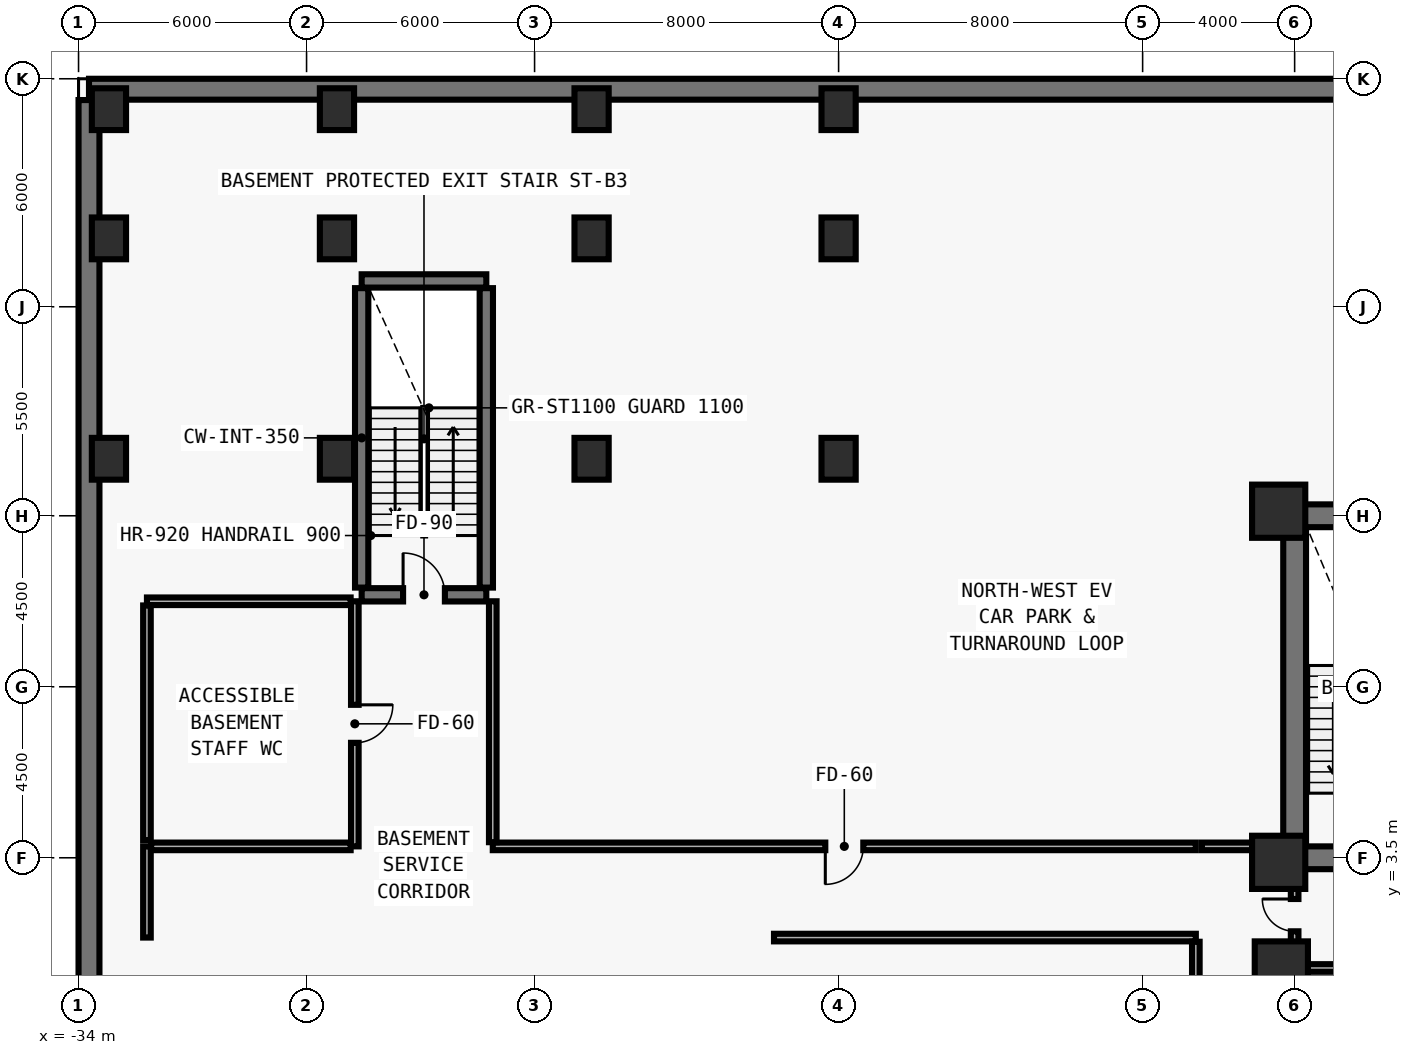
"""IFC4 building model, lengths in metres.
Left out: names, types, materials, properties, quantities, classifications, styles, units other than length and angle.
Written with IfcOpenShell. Run it as: python <this file> out.ifc"""

import sys

from ifc_helpers import new_model, si_unit, direction, frame, frame_2d, origin, origin_2d, place, context, subcontext, project, spatial, rectangle, extrude, element, fill, save


model = new_model("IFC4")
c1 = context("Model", 3, precision=1e-05, world=origin(), true_north=direction((0.0, 1.0)))
c2 = subcontext(c1, "Body", "Model", "MODEL_VIEW")
j1 = project(units=[si_unit("LENGTHUNIT", "METRE"), si_unit("PLANEANGLEUNIT", "RADIAN")], contexts=[c1])
p1 = place(None, origin())
s1 = spatial("IfcSite", under=j1, at=p1, CompositionType="ELEMENT")
p2 = place(p1, origin())
s2 = spatial("IfcBuilding", under=s1, at=p2, CompositionType="ELEMENT")
p3 = place(p2, frame((0.0, 0.0, -4.5)))
s3 = spatial("IfcBuildingStorey", under=s2, at=p3, CompositionType="ELEMENT", Elevation=-4.5)
p4 = place(p3, frame((-26.55, 10.42, 0.0), z_axis=(0.0, 0.0, 1.0), x_axis=(1.0, 0.0, 0.0)))
e1 = element("IfcWall", 1, at=p4, inside=s3, PredefinedType="SHEAR", context=c2, shape_type="SweptSolid", body=[
    extrude(rectangle(XDim=3.28, YDim=0.35, at=frame_2d((1.64, 0.0))), origin(), (0.0, 0.0, 1.0), 4.492),
])
p5 = place(p4, frame((1.09, 0.0, 0.0)))
e2 = element("IfcOpeningElement", 2, at=p5, cuts=e1, PredefinedType="OPENING", context=c2, shape_type="SweptSolid", body=[
    extrude(rectangle(XDim=1.1, YDim=2.15, at=frame_2d((0.55, 1.075))), frame((0.0, 0.185, 0.0), z_axis=(0.0, -1.0, 0.0), x_axis=(1.0, 0.0, 0.0)), (0.0, 0.0, 1.0), 0.37),
])
p6 = place(p3, frame((-26.55, 18.68, 0.0), z_axis=(0.0, 0.0, 1.0), x_axis=(1.0, 0.0, 0.0)))
e3 = element("IfcWall", 3, at=p6, inside=s3, PredefinedType="SHEAR", context=c2, shape_type="SweptSolid", body=[
    extrude(rectangle(XDim=3.28, YDim=0.35, at=frame_2d((1.64, 0.0))), origin(), (0.0, 0.0, 1.0), 4.492),
])
for number, where, z_axis, x_axis in (
    (4, (-26.55, 10.61, 0.0), (0.0, 0.0, 1.0), (0.0, 1.0, 0.0)),
    (5, (-23.27, 10.61, 0.0), (0.0, 0.0, 1.0), (0.0, 1.0, 0.0)),
):
    element("IfcWall", number, at=place(p3, frame(where, z_axis=z_axis, x_axis=x_axis)), inside=s3, PredefinedType="SHEAR", context=c2, shape_type="SweptSolid", body=[
        extrude(rectangle(XDim=7.88, YDim=0.35, at=frame_2d((3.94, 0.0))), origin(), (0.0, 0.0, 1.0), 4.492),
    ])
p7 = place(p3, frame((-2.0, 3.5, 0.0), z_axis=(0.0, 0.0, 1.0), x_axis=(1.0, 0.0, 0.0)))
e6 = element("IfcWall", 6, at=p7, inside=s3, PredefinedType="SHEAR", context=c2, shape_type="SweptSolid", body=[
    extrude(rectangle(XDim=10.0, YDim=0.6, at=frame_2d((5.0, 0.0))), origin(), (0.0, 0.0, 1.0), 4.492),
])
p8 = place(p7, frame((1.65, 0.0, 0.0)))
e7 = element("IfcOpeningElement", 7, at=p8, cuts=e6, PredefinedType="OPENING", context=c2, shape_type="SweptSolid", body=[
    extrude(rectangle(XDim=1.1, YDim=2.15, at=frame_2d((0.55, 1.075))), frame((0.0, 0.31, 0.0), z_axis=(0.0, -1.0, 0.0), x_axis=(1.0, 0.0, 0.0)), (0.0, 0.0, 1.0), 0.62),
])
p9 = place(p7, frame((7.65, 0.0, 0.0)))
e8 = element("IfcOpeningElement", 8, at=p9, cuts=e6, PredefinedType="OPENING", context=c2, shape_type="SweptSolid", body=[
    extrude(rectangle(XDim=1.1, YDim=2.15, at=frame_2d((0.55, 1.075))), frame((0.0, 0.31, 0.0), z_axis=(0.0, -1.0, 0.0), x_axis=(1.0, 0.0, 0.0)), (0.0, 0.0, 1.0), 0.62),
])
p10 = place(p7, frame((3.72, 0.0, 0.0)))
e9 = element("IfcOpeningElement", 9, at=p10, cuts=e6, PredefinedType="OPENING", context=c2, shape_type="SweptSolid", body=[
    extrude(rectangle(XDim=1.1, YDim=2.2, at=frame_2d((0.55, 1.1))), frame((0.0, 0.31, 0.0), z_axis=(0.0, -1.0, 0.0), x_axis=(1.0, 0.0, 0.0)), (0.0, 0.0, 1.0), 0.62),
])
p11 = place(p7, frame((5.18, 0.0, 0.0)))
e10 = element("IfcOpeningElement", 10, at=p11, cuts=e6, PredefinedType="OPENING", context=c2, shape_type="SweptSolid", body=[
    extrude(rectangle(XDim=1.1, YDim=2.2, at=frame_2d((0.55, 1.1))), frame((0.0, 0.31, 0.0), z_axis=(0.0, -1.0, 0.0), x_axis=(1.0, 0.0, 0.0)), (0.0, 0.0, 1.0), 0.62),
])
p12 = place(p3, frame((-2.0, 12.5, 0.0), z_axis=(0.0, 0.0, 1.0), x_axis=(1.0, 0.0, 0.0)))
e11 = element("IfcWall", 11, at=p12, inside=s3, PredefinedType="SHEAR", context=c2, shape_type="SweptSolid", body=[
    extrude(rectangle(XDim=10.0, YDim=0.6, at=frame_2d((5.0, 0.0))), origin(), (0.0, 0.0, 1.0), 4.492),
])
p13 = place(p12, frame((3.92, 0.0, 0.0)))
e12 = element("IfcOpeningElement", 12, at=p13, cuts=e11, PredefinedType="OPENING", context=c2, shape_type="SweptSolid", body=[
    extrude(rectangle(XDim=0.85, YDim=2.1, at=frame_2d((0.425, 1.05))), frame((0.0, 0.31, 0.0), z_axis=(0.0, -1.0, 0.0), x_axis=(1.0, 0.0, 0.0)), (0.0, 0.0, 1.0), 0.62),
])
p14 = place(p3, frame((-2.0, 3.81, 0.0), z_axis=(0.0, 0.0, 1.0), x_axis=(0.0, 1.0, 0.0)))
e13 = element("IfcWall", 13, at=p14, inside=s3, PredefinedType="SHEAR", context=c2, shape_type="SweptSolid", body=[
    extrude(rectangle(XDim=8.38, YDim=0.6, at=frame_2d((4.19, 0.0))), origin(), (0.0, 0.0, 1.0), 4.492),
])
p15 = place(p3, frame((-33.725, 23.725, 0.0), z_axis=(0.0, 0.0, 1.0), x_axis=(1.0, 0.0, 0.0)))
e14 = element("IfcWall", 14, at=p15, inside=s3, PredefinedType="SOLIDWALL", context=c2, shape_type="SweptSolid", body=[
    extrude(rectangle(XDim=67.45, YDim=0.55, at=frame_2d((33.725, 0.0))), origin(), (0.0, 0.0, 1.0), 4.492),
])
p16 = place(p3, frame((-33.725, -23.44, 0.0), z_axis=(0.0, 0.0, 1.0), x_axis=(0.0, 1.0, 0.0)))
e15 = element("IfcWall", 15, at=p16, inside=s3, PredefinedType="SOLIDWALL", context=c2, shape_type="SweptSolid", body=[
    extrude(rectangle(XDim=46.88, YDim=0.55, at=frame_2d((23.44, 0.0))), origin(), (0.0, 0.0, 1.0), 4.492),
])
for number, where, z_axis, x_axis in (
    (16, (-2.42, 12.62, 0.0), (0.0, 0.0, 1.0), (1.0, 0.0, 0.0)),
    (17, (-2.42, 3.38, 0.0), (0.0, 0.0, 1.0), (1.0, 0.0, 0.0)),
    (18, (-2.35, 0.6, 0.0), (0.0, 0.0, 1.0), (1.0, 0.0, 0.0)),
):
    element("IfcColumn", number, at=place(p3, frame(where, z_axis=z_axis, x_axis=x_axis)), inside=s3, PredefinedType="COLUMN", context=c2, shape_type="SweptSolid", body=[
        extrude(rectangle(XDim=1.4, YDim=1.4, at=origin_2d()), origin(), (0.0, 0.0, 1.0), 4.475),
    ])
for number, where, z_axis, x_axis in (
    (19, (-33.2, 14.0, 0.0), (0.0, 0.0, 1.0), (1.0, 0.0, 0.0)),
    (20, (-33.2, 19.8, 0.0), (0.0, 0.0, 1.0), (1.0, 0.0, 0.0)),
    (21, (-33.2, 23.2, 0.0), (0.0, 0.0, 1.0), (1.0, 0.0, 0.0)),
    (22, (-27.2, 14.0, 0.0), (0.0, 0.0, 1.0), (1.0, 0.0, 0.0)),
    (23, (-27.2, 19.8, 0.0), (0.0, 0.0, 1.0), (1.0, 0.0, 0.0)),
    (24, (-27.2, 23.2, 0.0), (0.0, 0.0, 1.0), (1.0, 0.0, 0.0)),
    (25, (-20.5, 14.0, 0.0), (0.0, 0.0, 1.0), (1.0, 0.0, 0.0)),
    (26, (-20.5, 19.8, 0.0), (0.0, 0.0, 1.0), (1.0, 0.0, 0.0)),
    (27, (-20.5, 23.2, 0.0), (0.0, 0.0, 1.0), (1.0, 0.0, 0.0)),
    (28, (-14.0, 14.0, 0.0), (0.0, 0.0, 1.0), (1.0, 0.0, 0.0)),
    (29, (-14.0, 19.8, 0.0), (0.0, 0.0, 1.0), (1.0, 0.0, 0.0)),
    (30, (-14.0, 23.2, 0.0), (0.0, 0.0, 1.0), (1.0, 0.0, 0.0)),
):
    element("IfcColumn", number, at=place(p3, frame(where, z_axis=z_axis, x_axis=x_axis)), inside=s3, PredefinedType="COLUMN", context=c2, shape_type="SweptSolid", body=[
        extrude(rectangle(XDim=0.9, YDim=1.1, at=origin_2d()), origin(), (0.0, 0.0, 1.0), 4.475),
    ])
p17 = place(p3, frame((-2.0, 0.72, 0.0), z_axis=(0.0, 0.0, 1.0), x_axis=(0.0, 1.0, 0.0)))
e31 = element("IfcWall", 31, at=p17, inside=s3, PredefinedType="MOVABLE", context=c2, shape_type="SweptSolid", body=[
    extrude(rectangle(XDim=2.25, YDim=0.2, at=frame_2d((1.125, 0.0))), origin(), (0.0, 0.0, 1.0), 3.262),
])
p18 = place(p17, frame((0.845, 0.0, 0.0)))
e32 = element("IfcOpeningElement", 32, at=p18, cuts=e31, PredefinedType="OPENING", context=c2, shape_type="SweptSolid", body=[
    extrude(rectangle(XDim=0.85, YDim=2.1, at=frame_2d((0.425, 1.05))), frame((0.0, 0.11, 0.0), z_axis=(0.0, -1.0, 0.0), x_axis=(1.0, 0.0, 0.0)), (0.0, 0.0, 1.0), 0.22),
])
p19 = place(p3, frame((-4.6, 3.8, 0.0), z_axis=(0.0, 0.0, 1.0), x_axis=(-1.0, 0.0, 0.0)))
e33 = element("IfcWall", 33, at=p19, inside=s3, PredefinedType="MOVABLE", context=c2, shape_type="SweptSolid", body=[
    extrude(rectangle(XDim=18.5, YDim=0.2, at=frame_2d((9.25, 0.0))), origin(), (0.0, 0.0, 1.0), 4.18),
])
p20 = place(p19, frame((8.75, 0.0, 0.0)))
e34 = element("IfcOpeningElement", 34, at=p20, cuts=e33, PredefinedType="OPENING", context=c2, shape_type="SweptSolid", body=[
    extrude(rectangle(XDim=1.0, YDim=2.1, at=frame_2d((0.5, 1.05))), frame((0.0, 0.11, 0.0), z_axis=(0.0, -1.0, 0.0), x_axis=(1.0, 0.0, 0.0)), (0.0, 0.0, 1.0), 0.22),
])
p21 = place(p3, frame((-26.73, 10.25, 0.0), z_axis=(0.0, 0.0, 1.0), x_axis=(0.0, -1.0, 0.0)))
e35 = element("IfcWall", 35, at=p21, inside=s3, PredefinedType="MOVABLE", context=c2, shape_type="SweptSolid", body=[
    extrude(rectangle(XDim=6.45, YDim=0.2, at=frame_2d((3.225, 0.0))), origin(), (0.0, 0.0, 1.0), 4.18),
])
p22 = place(p21, frame((2.725, 0.0, 0.0)))
e36 = element("IfcOpeningElement", 36, at=p22, cuts=e35, PredefinedType="OPENING", context=c2, shape_type="SweptSolid", body=[
    extrude(rectangle(XDim=1.0, YDim=2.1, at=frame_2d((0.5, 1.05))), frame((0.0, 0.11, 0.0), z_axis=(0.0, -1.0, 0.0), x_axis=(1.0, 0.0, 0.0)), (0.0, 0.0, 1.0), 0.22),
])
p23 = place(p3, frame((-1.88, 0.6, 0.0), z_axis=(0.0, 0.0, 1.0), x_axis=(1.0, 0.0, 0.0)))
e37 = element("IfcWall", 37, at=p23, inside=s3, PredefinedType="MOVABLE", context=c2, shape_type="SweptSolid", body=[
    extrude(rectangle(XDim=5.72, YDim=0.2, at=frame_2d((2.86, 0.0))), origin(), (0.0, 0.0, 1.0), 3.362),
])
p24 = place(p3, frame((-2.0, -4.09, 0.0), z_axis=(0.0, 0.0, 1.0), x_axis=(0.0, 1.0, 0.0)))
e38 = element("IfcWall", 38, at=p24, inside=s3, PredefinedType="MOVABLE", context=c2, shape_type="SweptSolid", body=[
    extrude(rectangle(XDim=4.59, YDim=0.2, at=frame_2d((2.295, 0.0))), origin(), (0.0, 0.0, 1.0), 3.362),
])
p25 = place(p3, frame((-15.7, 1.4, 0.0), z_axis=(0.0, 0.0, 1.0), x_axis=(1.0, 0.0, 0.0)))
e39 = element("IfcWall", 39, at=p25, inside=s3, PredefinedType="MOVABLE", context=c2, shape_type="SweptSolid", body=[
    extrude(rectangle(XDim=11.1, YDim=0.2, at=frame_2d((5.55, 0.0))), origin(), (0.0, 0.0, 1.0), 4.18),
])
p26 = place(p3, frame((-4.6, 1.29, 0.0), z_axis=(0.0, 0.0, 1.0), x_axis=(0.0, -1.0, 0.0)))
e40 = element("IfcWall", 40, at=p26, inside=s3, PredefinedType="MOVABLE", context=c2, shape_type="SweptSolid", body=[
    extrude(rectangle(XDim=5.49, YDim=0.2, at=frame_2d((2.745, 0.0))), origin(), (0.0, 0.0, 1.0), 4.18),
])
p27 = place(p3, frame((-23.1, 3.91, 0.0), z_axis=(0.0, 0.0, 1.0), x_axis=(0.0, 1.0, 0.0)))
e41 = element("IfcWall", 41, at=p27, inside=s3, PredefinedType="MOVABLE", context=c2, shape_type="SweptSolid", body=[
    extrude(rectangle(XDim=6.34, YDim=0.2, at=frame_2d((3.17, 0.0))), origin(), (0.0, 0.0, 1.0), 4.18),
])
p28 = place(p3, frame((-2.36, 3.8, 0.0), z_axis=(0.0, 0.0, 1.0), x_axis=(-1.0, 0.0, 0.0)))
e42 = element("IfcWall", 42, at=p28, inside=s3, PredefinedType="MOVABLE", context=c2, shape_type="SweptSolid", body=[
    extrude(rectangle(XDim=2.08, YDim=0.2, at=frame_2d((1.04, 0.0))), origin(), (0.0, 0.0, 1.0), 4.18),
])
p29 = place(p3, frame((-32.2, 3.8, 0.0), z_axis=(0.0, 0.0, 1.0), x_axis=(0.0, -1.0, 0.0)))
e43 = element("IfcWall", 43, at=p29, inside=s3, PredefinedType="MOVABLE", context=c2, shape_type="SweptSolid", body=[
    extrude(rectangle(XDim=2.4, YDim=0.2, at=frame_2d((1.2, 0.0))), origin(), (0.0, 0.0, 1.0), 4.18),
])
p30 = place(p3, frame((-26.84, 3.8, 0.0), z_axis=(0.0, 0.0, 1.0), x_axis=(-1.0, 0.0, 0.0)))
e44 = element("IfcWall", 44, at=p30, inside=s3, PredefinedType="MOVABLE", context=c2, shape_type="SweptSolid", body=[
    extrude(rectangle(XDim=5.25, YDim=0.2, at=frame_2d((2.625, 0.0))), origin(), (0.0, 0.0, 1.0), 4.18),
])
p31 = place(p3, frame((-26.84, 10.25, 0.0), z_axis=(0.0, 0.0, 1.0), x_axis=(-1.0, 0.0, 0.0)))
e45 = element("IfcWall", 45, at=p31, inside=s3, PredefinedType="MOVABLE", context=c2, shape_type="SweptSolid", body=[
    extrude(rectangle(XDim=5.36, YDim=0.2, at=frame_2d((2.68, 0.0))), origin(), (0.0, 0.0, 1.0), 4.18),
])
p32 = place(p3, frame((-32.2, 10.14, 0.0), z_axis=(0.0, 0.0, 1.0), x_axis=(0.0, -1.0, 0.0)))
e46 = element("IfcWall", 46, at=p32, inside=s3, PredefinedType="MOVABLE", context=c2, shape_type="SweptSolid", body=[
    extrude(rectangle(XDim=6.18, YDim=0.2, at=frame_2d((3.09, 0.0))), origin(), (0.0, 0.0, 1.0), 4.18),
])
p33 = place(p5, origin())
e47 = element("IfcDoor", 47, at=p33, inside=s3, OperationType="SINGLE_SWING_LEFT", PredefinedType="DOOR", context=c2, shape_type="SweptSolid", body=[
    extrude(rectangle(XDim=1.1, YDim=2.15, at=frame_2d((0.55, 1.075))), frame((0.0, 0.025, 0.0), z_axis=(0.0, -1.0, 0.0), x_axis=(1.0, 0.0, 0.0)), (0.0, 0.0, 1.0), 0.05),
])
fill(e2, e47)
p34 = place(p18, origin())
e48 = element("IfcDoor", 48, at=p34, inside=s3, OperationType="SINGLE_SWING_RIGHT", PredefinedType="DOOR", context=c2, shape_type="SweptSolid", body=[
    extrude(rectangle(XDim=0.85, YDim=2.1, at=frame_2d((0.425, 1.05))), frame((0.0, 0.025, 0.0), z_axis=(0.0, -1.0, 0.0), x_axis=(1.0, 0.0, 0.0)), (0.0, 0.0, 1.0), 0.05),
])
fill(e32, e48)
p35 = place(p20, origin())
e49 = element("IfcDoor", 49, at=p35, inside=s3, OperationType="SINGLE_SWING_RIGHT", PredefinedType="DOOR", context=c2, shape_type="SweptSolid", body=[
    extrude(rectangle(XDim=1.0, YDim=2.1, at=frame_2d((0.5, 1.05))), frame((0.0, 0.025, 0.0), z_axis=(0.0, -1.0, 0.0), x_axis=(1.0, 0.0, 0.0)), (0.0, 0.0, 1.0), 0.05),
])
fill(e34, e49)
p36 = place(p22, origin())
e50 = element("IfcDoor", 50, at=p36, inside=s3, OperationType="SINGLE_SWING_LEFT", PredefinedType="DOOR", context=c2, shape_type="SweptSolid", body=[
    extrude(rectangle(XDim=1.0, YDim=2.1, at=frame_2d((0.5, 1.05))), frame((0.0, 0.025, 0.0), z_axis=(0.0, -1.0, 0.0), x_axis=(1.0, 0.0, 0.0)), (0.0, 0.0, 1.0), 0.05),
])
fill(e36, e50)
save(model, sys.argv[1])
